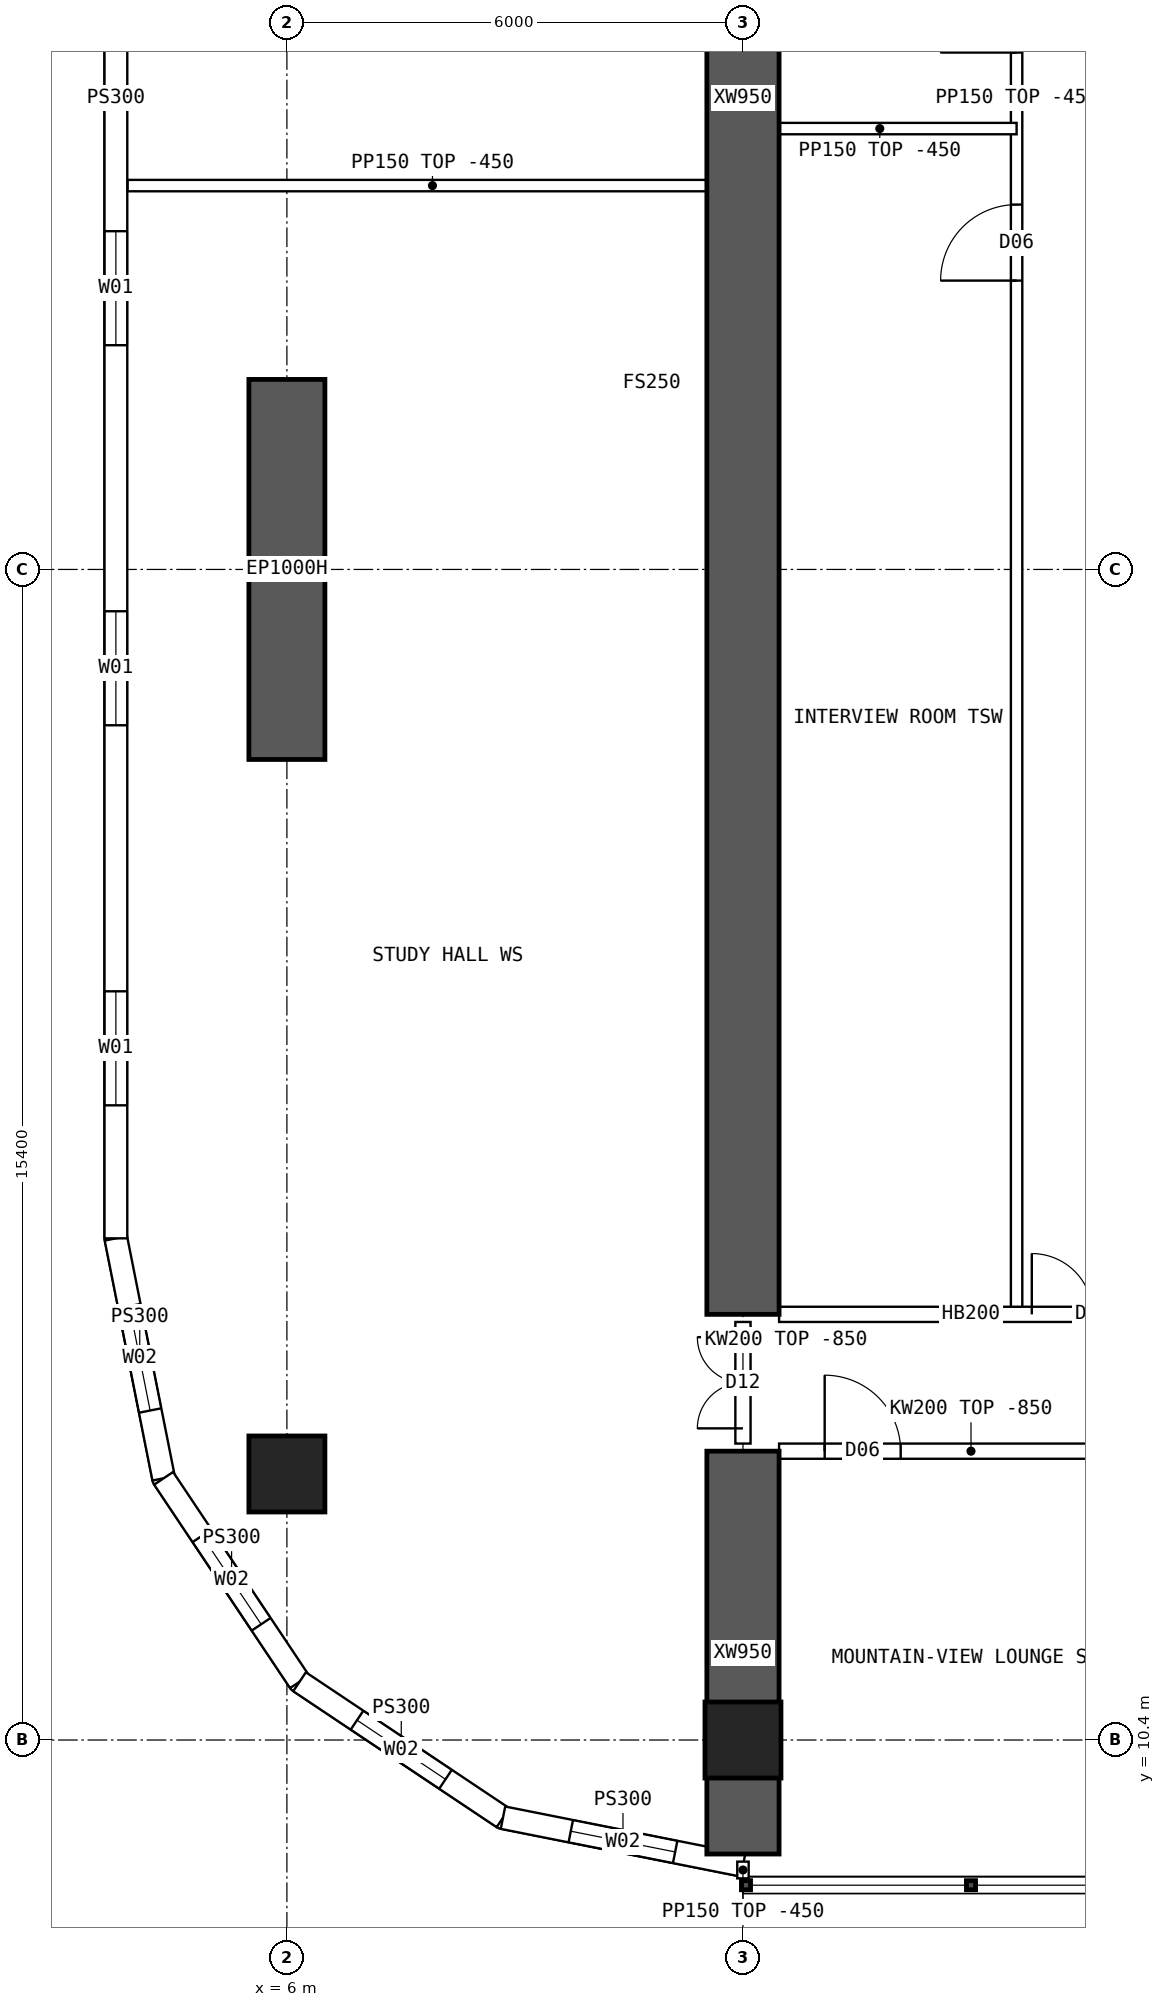
"""IFC4 building model, lengths in metres.
Left out: names, types, materials, properties, quantities, classifications, styles, units other than length and angle.
Written with IfcOpenShell. Run it as: python <this file> out.ifc"""

import sys

from ifc_helpers import new_model, si_unit, direction, frame, frame_2d, origin, origin_2d, place, context, subcontext, project, spatial, polyline, rectangle, hollow_rectangle, outline, extrude, element, fill, save


model = new_model("IFC4")
c1 = context("Model", 3, precision=1e-05, world=origin(), true_north=direction((0.0, 1.0)))
c2 = subcontext(c1, "Body", "Model", "MODEL_VIEW")
j1 = project(units=[si_unit("LENGTHUNIT", "METRE"), si_unit("PLANEANGLEUNIT", "RADIAN")], contexts=[c1])
p1 = place(None, origin())
s1 = spatial("IfcSite", under=j1, at=p1, CompositionType="ELEMENT")
p2 = place(p1, origin())
s2 = spatial("IfcBuilding", under=s1, at=p2, CompositionType="ELEMENT")
p3 = place(p2, frame((0.0, 0.0, 95.65)))
s3 = spatial("IfcBuildingStorey", under=s2, at=p3, CompositionType="ELEMENT", Elevation=95.65)
for number, where, z_axis, x_axis in (
    (1, (12.0, 10.4, 0.0), (0.0, 0.0, 1.0), (1.0, 0.0, 0.0)),
    (2, (6.0, 13.9, 0.0), (0.0, 0.0, 1.0), (1.0, 0.0, 0.0)),
):
    element("IfcColumn", number, at=place(p3, frame(where, z_axis=z_axis, x_axis=x_axis)), inside=s3, PredefinedType="COLUMN", context=c2, shape_type="SweptSolid", body=[
        extrude(hollow_rectangle(XDim=1.0, YDim=1.0, WallThickness=0.1, at=origin_2d()), origin(), (0.0, 0.0, 1.0), 3.75),
    ])
p4 = place(p3, frame((6.0, 23.3, 0.0), z_axis=(0.0, 0.0, 1.0), x_axis=(0.0, 1.0, 0.0)))
e3 = element("IfcWall", 3, at=p4, inside=s3, PredefinedType="SHEAR", context=c2, shape_type="SweptSolid", body=[
    extrude(rectangle(XDim=5.0, YDim=1.0, at=frame_2d((2.5, 0.0))), origin(), (0.0, 0.0, 1.0), 3.75),
])
p5 = place(p3, frame((12.0, 8.9, 0.0), z_axis=(0.0, 0.0, 1.0), x_axis=(0.0, 1.0, 0.0)))
e4 = element("IfcWall", 4, at=p5, inside=s3, PredefinedType="SHEAR", context=c2, shape_type="SweptSolid", body=[
    extrude(rectangle(XDim=5.3, YDim=0.95, at=frame_2d((2.65, 0.0))), origin(), (0.0, 0.0, 1.0), 3.75),
])
p6 = place(p3, frame((12.0, 16.0, 0.0), z_axis=(0.0, 0.0, 1.0), x_axis=(0.0, 1.0, 0.0)))
e5 = element("IfcWall", 5, at=p6, inside=s3, PredefinedType="SHEAR", context=c2, shape_type="SweptSolid", body=[
    extrude(rectangle(XDim=32.0, YDim=0.95, at=frame_2d((16.0, 0.0))), origin(), (0.0, 0.0, 1.0), 3.75),
])
p7 = place(p3, frame((3.75, 47.0, 0.0), z_axis=(0.0, 0.0, 1.0), x_axis=(0.0, -1.0, 0.0)))
e6 = element("IfcWall", 6, at=p7, inside=s3, PredefinedType="SOLIDWALL", context=c2, shape_type="SweptSolid", body=[
    extrude(outline(polyline([(-0.015, -0.15), (30.015, -0.15), (29.985, 0.15), (0.015, 0.15), (-0.015, -0.15)])), origin(), (0.0, 0.0, 1.0), 3.3),
])
p8 = place(p7, frame((1.75, 0.0, 0.9)))
e7 = element("IfcOpeningElement", 7, at=p8, cuts=e6, PredefinedType="OPENING", context=c2, shape_type="SweptSolid", body=[
    extrude(rectangle(XDim=1.5, YDim=2.0, at=frame_2d((0.75, 1.0))), frame((0.0, 0.16, 0.0), z_axis=(0.0, -1.0, 0.0), x_axis=(1.0, 0.0, 0.0)), (0.0, 0.0, 1.0), 0.32),
])
p9 = place(p7, frame((6.75, 0.0, 0.9)))
e8 = element("IfcOpeningElement", 8, at=p9, cuts=e6, PredefinedType="OPENING", context=c2, shape_type="SweptSolid", body=[
    extrude(rectangle(XDim=1.5, YDim=2.0, at=frame_2d((0.75, 1.0))), frame((0.0, 0.16, 0.0), z_axis=(0.0, -1.0, 0.0), x_axis=(1.0, 0.0, 0.0)), (0.0, 0.0, 1.0), 0.32),
])
p10 = place(p7, frame((11.75, 0.0, 0.9)))
e9 = element("IfcOpeningElement", 9, at=p10, cuts=e6, PredefinedType="OPENING", context=c2, shape_type="SweptSolid", body=[
    extrude(rectangle(XDim=1.5, YDim=2.0, at=frame_2d((0.75, 1.0))), frame((0.0, 0.16, 0.0), z_axis=(0.0, -1.0, 0.0), x_axis=(1.0, 0.0, 0.0)), (0.0, 0.0, 1.0), 0.32),
])
p11 = place(p7, frame((16.75, 0.0, 0.9)))
e10 = element("IfcOpeningElement", 10, at=p11, cuts=e6, PredefinedType="OPENING", context=c2, shape_type="SweptSolid", body=[
    extrude(rectangle(XDim=1.5, YDim=2.0, at=frame_2d((0.75, 1.0))), frame((0.0, 0.16, 0.0), z_axis=(0.0, -1.0, 0.0), x_axis=(1.0, 0.0, 0.0)), (0.0, 0.0, 1.0), 0.32),
])
p12 = place(p7, frame((21.75, 0.0, 0.9)))
e11 = element("IfcOpeningElement", 11, at=p12, cuts=e6, PredefinedType="OPENING", context=c2, shape_type="SweptSolid", body=[
    extrude(rectangle(XDim=1.5, YDim=2.0, at=frame_2d((0.75, 1.0))), frame((0.0, 0.16, 0.0), z_axis=(0.0, -1.0, 0.0), x_axis=(1.0, 0.0, 0.0)), (0.0, 0.0, 1.0), 0.32),
])
p13 = place(p7, frame((26.75, 0.0, 0.9)))
e12 = element("IfcOpeningElement", 12, at=p13, cuts=e6, PredefinedType="OPENING", context=c2, shape_type="SweptSolid", body=[
    extrude(rectangle(XDim=1.5, YDim=2.0, at=frame_2d((0.75, 1.0))), frame((0.0, 0.16, 0.0), z_axis=(0.0, -1.0, 0.0), x_axis=(1.0, 0.0, 0.0)), (0.0, 0.0, 1.0), 0.32),
])
p14 = place(p3, frame((3.75, 17.0, 0.0), z_axis=(0.0, 0.0, 1.0), x_axis=(0.195080412259, -0.980787251524, 0.0)))
e13 = element("IfcWall", 13, at=p14, inside=s3, PredefinedType="SOLIDWALL", context=c2, shape_type="SweptSolid", body=[
    extrude(outline(polyline([(-0.015, -0.15), (3.249, -0.15), (3.189, 0.15), (0.015, 0.15), (-0.015, -0.15)])), origin(), (0.0, 0.0, 1.0), 3.3),
])
p15 = place(p14, frame((0.909, 0.0, 0.9)))
e14 = element("IfcOpeningElement", 14, at=p15, cuts=e13, PredefinedType="OPENING", context=c2, shape_type="SweptSolid", body=[
    extrude(rectangle(XDim=1.4, YDim=1.8, at=frame_2d((0.7, 0.9))), frame((0.0, 0.16, 0.0), z_axis=(0.0, -1.0, 0.0), x_axis=(1.0, 0.0, 0.0)), (0.0, 0.0, 1.0), 0.32),
])
p16 = place(p3, frame((4.378, 13.843, 0.0), z_axis=(0.0, 0.0, 1.0), x_axis=(0.555609954424, -0.831443069936, 0.0)))
e15 = element("IfcWall", 15, at=p16, inside=s3, PredefinedType="SOLIDWALL", context=c2, shape_type="SweptSolid", body=[
    extrude(outline(polyline([(-0.03, -0.15), (3.249, -0.15), (3.189, 0.15), (0.03, 0.15), (-0.03, -0.15)])), origin(), (0.0, 0.0, 1.0), 3.3),
])
p17 = place(p16, frame((0.909, 0.0, 0.9)))
e16 = element("IfcOpeningElement", 16, at=p17, cuts=e15, PredefinedType="OPENING", context=c2, shape_type="SweptSolid", body=[
    extrude(rectangle(XDim=1.4, YDim=1.8, at=frame_2d((0.7, 0.9))), frame((0.0, 0.16, 0.0), z_axis=(0.0, -1.0, 0.0), x_axis=(1.0, 0.0, 0.0)), (0.0, 0.0, 1.0), 0.32),
])
p18 = place(p3, frame((6.167, 11.167, 0.0), z_axis=(0.0, 0.0, 1.0), x_axis=(0.831443069936, -0.555609954424, 0.0)))
e17 = element("IfcWall", 17, at=p18, inside=s3, PredefinedType="SOLIDWALL", context=c2, shape_type="SweptSolid", body=[
    extrude(outline(polyline([(-0.03, -0.15), (3.249, -0.15), (3.189, 0.15), (0.03, 0.15), (-0.03, -0.15)])), origin(), (0.0, 0.0, 1.0), 3.3),
])
p19 = place(p18, frame((0.909, 0.0, 0.9)))
e18 = element("IfcOpeningElement", 18, at=p19, cuts=e17, PredefinedType="OPENING", context=c2, shape_type="SweptSolid", body=[
    extrude(rectangle(XDim=1.4, YDim=1.8, at=frame_2d((0.7, 0.9))), frame((0.0, 0.16, 0.0), z_axis=(0.0, -1.0, 0.0), x_axis=(1.0, 0.0, 0.0)), (0.0, 0.0, 1.0), 0.32),
])
p20 = place(p3, frame((8.843, 9.378, 0.0), z_axis=(0.0, 0.0, 1.0), x_axis=(0.980787251524, -0.195080412259, 0.0)))
e19 = element("IfcWall", 19, at=p20, inside=s3, PredefinedType="SOLIDWALL", context=c2, shape_type="SweptSolid", body=[
    extrude(outline(polyline([(-0.03, -0.15), (3.249, -0.15), (3.189, 0.15), (0.03, 0.15), (-0.03, -0.15)])), origin(), (0.0, 0.0, 1.0), 3.3),
])
p21 = place(p20, frame((0.909, 0.0, 0.9)))
e20 = element("IfcOpeningElement", 20, at=p21, cuts=e19, PredefinedType="OPENING", context=c2, shape_type="SweptSolid", body=[
    extrude(rectangle(XDim=1.4, YDim=1.8, at=frame_2d((0.7, 0.9))), frame((0.0, 0.16, 0.0), z_axis=(0.0, -1.0, 0.0), x_axis=(1.0, 0.0, 0.0)), (0.0, 0.0, 1.0), 0.32),
])
p22 = place(p3, frame((12.475, 14.2, 0.0), z_axis=(0.0, 0.0, 1.0), x_axis=(1.0, 0.0, 0.0)))
e21 = element("IfcWall", 21, at=p22, inside=s3, PredefinedType="SOLIDWALL", context=c2, shape_type="SweptSolid", body=[
    extrude(outline(polyline([(0.0, 0.0), (5.05, 0.0), (5.05, 2.9), (0.0, 2.9), (0.0, 0.0)])), frame((0.0, 0.1, 0.0), z_axis=(0.0, -1.0, 0.0), x_axis=(1.0, 0.0, 0.0)), (0.0, 0.0, 1.0), 0.2),
])
p23 = place(p22, frame((0.6, 0.0, 0.0)))
e22 = element("IfcOpeningElement", 22, at=p23, cuts=e21, PredefinedType="OPENING", context=c2, shape_type="SweptSolid", body=[
    extrude(rectangle(XDim=1.0, YDim=2.1, at=frame_2d((0.5, 1.05))), frame((0.0, 0.11, 0.0), z_axis=(0.0, -1.0, 0.0), x_axis=(1.0, 0.0, 0.0)), (0.0, 0.0, 1.0), 0.22),
])
p24 = place(p3, frame((12.475, 16.0, 0.0), z_axis=(0.0, 0.0, 1.0), x_axis=(1.0, 0.0, 0.0)))
e23 = element("IfcWall", 23, at=p24, inside=s3, PredefinedType="SOLIDWALL", context=c2, shape_type="SweptSolid", body=[
    extrude(rectangle(XDim=5.05, YDim=0.2, at=frame_2d((2.525, 0.0))), origin(), (0.0, 0.0, 1.0), 3.3),
])
p25 = place(p24, frame((3.325, 0.0, 0.0)))
e24 = element("IfcOpeningElement", 24, at=p25, cuts=e23, PredefinedType="OPENING", context=c2, shape_type="SweptSolid", body=[
    extrude(rectangle(XDim=1.6, YDim=2.1, at=frame_2d((0.8, 1.05))), frame((0.0, 0.11, 0.0), z_axis=(0.0, -1.0, 0.0), x_axis=(1.0, 0.0, 0.0)), (0.0, 0.0, 1.0), 0.22),
])
p26 = place(p3, frame((15.6, 16.1, 0.0), z_axis=(0.0, 0.0, 1.0), x_axis=(0.0, 1.0, 0.0)))
e25 = element("IfcWall", 25, at=p26, inside=s3, PredefinedType="PARTITIONING", context=c2, shape_type="SweptSolid", body=[
    extrude(rectangle(XDim=31.8, YDim=0.15, at=frame_2d((15.9, 0.0))), origin(), (0.0, 0.0, 1.0), 3.3),
])
p27 = place(p26, frame((13.5, 0.0, 0.0)))
e26 = element("IfcOpeningElement", 26, at=p27, cuts=e25, PredefinedType="OPENING", context=c2, shape_type="SweptSolid", body=[
    extrude(rectangle(XDim=1.0, YDim=2.1, at=frame_2d((0.5, 1.05))), frame((0.0, 0.085, 0.0), z_axis=(0.0, -1.0, 0.0), x_axis=(1.0, 0.0, 0.0)), (0.0, 0.0, 1.0), 0.17),
])
p28 = place(p26, frame((16.5, 0.0, 0.0)))
e27 = element("IfcOpeningElement", 27, at=p28, cuts=e25, PredefinedType="OPENING", context=c2, shape_type="SweptSolid", body=[
    extrude(rectangle(XDim=1.0, YDim=2.1, at=frame_2d((0.5, 1.05))), frame((0.0, 0.085, 0.0), z_axis=(0.0, -1.0, 0.0), x_axis=(1.0, 0.0, 0.0)), (0.0, 0.0, 1.0), 0.17),
])
p29 = place(p3, frame((12.0, 31.6, 0.0), z_axis=(0.0, 0.0, 1.0), x_axis=(1.0, 0.0, 0.0)))
e28 = element("IfcWall", 28, at=p29, inside=s3, PredefinedType="PARTITIONING", context=c2, shape_type="SweptSolid", body=[
    extrude(rectangle(XDim=3.6, YDim=0.15, at=frame_2d((1.8, 0.0))), origin(), (0.0, 0.0, 1.0), 3.3),
])
p30 = place(p3, frame((3.905, 30.85, 0.0), z_axis=(0.0, 0.0, 1.0), x_axis=(1.0, 0.0, 0.0)))
e29 = element("IfcWall", 29, at=p30, inside=s3, PredefinedType="PARTITIONING", context=c2, shape_type="SweptSolid", body=[
    extrude(outline(polyline([(0.0, 0.0), (8.02, 0.0), (8.02, 3.3), (2.397, 3.3), (2.395, 2.85), (1.797, 2.85), (1.795, 3.3), (0.0, 3.3), (0.0, 0.0)])), frame((0.0, 0.075, 0.0), z_axis=(0.0, -1.0, 0.0), x_axis=(1.0, 0.0, 0.0)), (0.0, 0.0, 1.0), 0.15),
])
p31 = place(p3, frame((12.0, 14.3, 0.0), z_axis=(0.0, 0.0, 1.0), x_axis=(0.0, 1.0, 0.0)))
e30 = element("IfcWall", 30, at=p31, inside=s3, PredefinedType="SOLIDWALL", context=c2, shape_type="SweptSolid", body=[
    extrude(outline(polyline([(0.0, 0.0), (1.6, 0.0), (1.6, 2.9), (0.0, 2.9), (0.0, 0.0)])), frame((0.0, 0.1, 0.0), z_axis=(0.0, -1.0, 0.0), x_axis=(1.0, 0.0, 0.0)), (0.0, 0.0, 1.0), 0.2),
])
p32 = place(p31, frame((0.2, 0.0, 0.0)))
e31 = element("IfcOpeningElement", 31, at=p32, cuts=e30, PredefinedType="OPENING", context=c2, shape_type="SweptSolid", body=[
    extrude(rectangle(XDim=1.2, YDim=2.1, at=frame_2d((0.6, 1.05))), frame((0.0, 0.11, 0.0), z_axis=(0.0, -1.0, 0.0), x_axis=(1.0, 0.0, 0.0)), (0.0, 0.0, 1.0), 0.22),
])
p33 = place(p3, frame((12.0, 8.8, 0.0), z_axis=(0.0, 0.0, 1.0), x_axis=(0.0, -1.0, 0.0)))
e32 = element("IfcWall", 32, at=p33, inside=s3, PredefinedType="PARTITIONING", context=c2, shape_type="SweptSolid", body=[
    extrude(rectangle(XDim=0.22, YDim=0.15, at=frame_2d((0.11, 0.0))), origin(), (0.0, 0.0, 1.0), 3.3),
])
p34 = place(p11, origin())
e33 = element("IfcWindow", 33, at=p34, inside=s3, PartitioningType="SINGLE_PANEL", PredefinedType="WINDOW", context=c2, shape_type="SweptSolid", body=[
    extrude(rectangle(XDim=1.5, YDim=2.0, at=frame_2d((0.75, 1.0))), frame((0.0, 0.03, 0.0), z_axis=(0.0, -1.0, 0.0), x_axis=(1.0, 0.0, 0.0)), (0.0, 0.0, 1.0), 0.06),
])
fill(e10, e33)
p35 = place(p12, origin())
e34 = element("IfcWindow", 34, at=p35, inside=s3, PartitioningType="SINGLE_PANEL", PredefinedType="WINDOW", context=c2, shape_type="SweptSolid", body=[
    extrude(rectangle(XDim=1.5, YDim=2.0, at=frame_2d((0.75, 1.0))), frame((0.0, 0.03, 0.0), z_axis=(0.0, -1.0, 0.0), x_axis=(1.0, 0.0, 0.0)), (0.0, 0.0, 1.0), 0.06),
])
fill(e11, e34)
p36 = place(p13, origin())
e35 = element("IfcWindow", 35, at=p36, inside=s3, PartitioningType="SINGLE_PANEL", PredefinedType="WINDOW", context=c2, shape_type="SweptSolid", body=[
    extrude(rectangle(XDim=1.5, YDim=2.0, at=frame_2d((0.75, 1.0))), frame((0.0, 0.03, 0.0), z_axis=(0.0, -1.0, 0.0), x_axis=(1.0, 0.0, 0.0)), (0.0, 0.0, 1.0), 0.06),
])
fill(e12, e35)
p37 = place(p15, origin())
e36 = element("IfcWindow", 36, at=p37, inside=s3, PartitioningType="SINGLE_PANEL", PredefinedType="WINDOW", context=c2, shape_type="SweptSolid", body=[
    extrude(rectangle(XDim=1.4, YDim=1.8, at=frame_2d((0.7, 0.9))), frame((0.0, 0.03, 0.0), z_axis=(0.0, -1.0, 0.0), x_axis=(1.0, 0.0, 0.0)), (0.0, 0.0, 1.0), 0.06),
])
fill(e14, e36)
p38 = place(p17, origin())
e37 = element("IfcWindow", 37, at=p38, inside=s3, PartitioningType="SINGLE_PANEL", PredefinedType="WINDOW", context=c2, shape_type="SweptSolid", body=[
    extrude(rectangle(XDim=1.4, YDim=1.8, at=frame_2d((0.7, 0.9))), frame((0.0, 0.03, 0.0), z_axis=(0.0, -1.0, 0.0), x_axis=(1.0, 0.0, 0.0)), (0.0, 0.0, 1.0), 0.06),
])
fill(e16, e37)
p39 = place(p19, origin())
e38 = element("IfcWindow", 38, at=p39, inside=s3, PartitioningType="SINGLE_PANEL", PredefinedType="WINDOW", context=c2, shape_type="SweptSolid", body=[
    extrude(rectangle(XDim=1.4, YDim=1.8, at=frame_2d((0.7, 0.9))), frame((0.0, 0.03, 0.0), z_axis=(0.0, -1.0, 0.0), x_axis=(1.0, 0.0, 0.0)), (0.0, 0.0, 1.0), 0.06),
])
fill(e18, e38)
p40 = place(p21, origin())
e39 = element("IfcWindow", 39, at=p40, inside=s3, PartitioningType="SINGLE_PANEL", PredefinedType="WINDOW", context=c2, shape_type="SweptSolid", body=[
    extrude(rectangle(XDim=1.4, YDim=1.8, at=frame_2d((0.7, 0.9))), frame((0.0, 0.03, 0.0), z_axis=(0.0, -1.0, 0.0), x_axis=(1.0, 0.0, 0.0)), (0.0, 0.0, 1.0), 0.06),
])
fill(e20, e39)
p41 = place(p25, origin())
e40 = element("IfcDoor", 40, at=p41, inside=s3, OperationType="DOUBLE_DOOR_SINGLE_SWING", PredefinedType="DOOR", context=c2, shape_type="SweptSolid", body=[
    extrude(rectangle(XDim=1.6, YDim=2.1, at=frame_2d((0.8, 1.05))), frame((0.0, 0.025, 0.0), z_axis=(0.0, -1.0, 0.0), x_axis=(1.0, 0.0, 0.0)), (0.0, 0.0, 1.0), 0.05),
])
fill(e24, e40)
p42 = place(p23, origin())
e41 = element("IfcDoor", 41, at=p42, inside=s3, OperationType="SINGLE_SWING_LEFT", PredefinedType="DOOR", context=c2, shape_type="SweptSolid", body=[
    extrude(rectangle(XDim=1.0, YDim=2.1, at=frame_2d((0.5, 1.05))), frame((0.0, 0.025, 0.0), z_axis=(0.0, -1.0, 0.0), x_axis=(1.0, 0.0, 0.0)), (0.0, 0.0, 1.0), 0.05),
])
fill(e22, e41)
p43 = place(p27, origin())
e42 = element("IfcDoor", 42, at=p43, inside=s3, OperationType="SINGLE_SWING_LEFT", PredefinedType="DOOR", context=c2, shape_type="SweptSolid", body=[
    extrude(rectangle(XDim=1.0, YDim=2.1, at=frame_2d((0.5, 1.05))), frame((0.0, 0.025, 0.0), z_axis=(0.0, -1.0, 0.0), x_axis=(1.0, 0.0, 0.0)), (0.0, 0.0, 1.0), 0.05),
])
fill(e26, e42)
p44 = place(p32, origin())
e43 = element("IfcDoor", 43, at=p44, inside=s3, OperationType="DOUBLE_DOOR_SINGLE_SWING", PredefinedType="DOOR", context=c2, shape_type="SweptSolid", body=[
    extrude(rectangle(XDim=1.2, YDim=2.1, at=frame_2d((0.6, 1.05))), frame((0.0, 0.025, 0.0), z_axis=(0.0, -1.0, 0.0), x_axis=(1.0, 0.0, 0.0)), (0.0, 0.0, 1.0), 0.05),
])
fill(e31, e43)
save(model, sys.argv[1])
